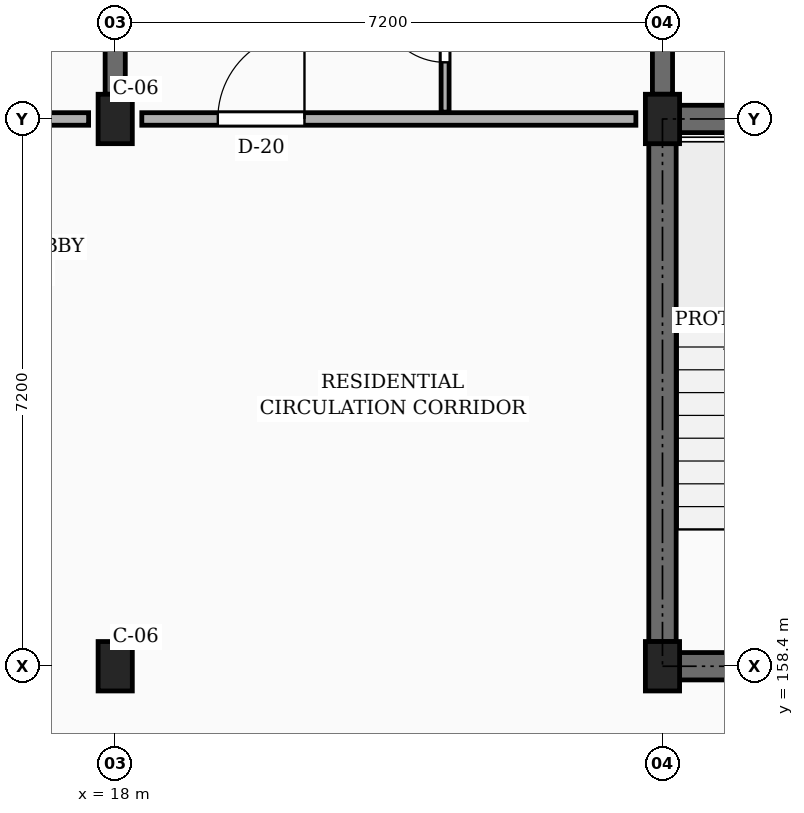
"""IFC4 building model, lengths in metres.
Left out: names, types, materials, properties, quantities, classifications, styles, units other than length and angle.
Written with IfcOpenShell. Run it as: python <this file> out.ifc"""

import sys

from ifc_helpers import new_model, si_unit, direction, frame, frame_2d, origin, origin_2d, place, context, subcontext, project, spatial, rectangle, extrude, element, fill, save


model = new_model("IFC4")
c1 = context("Model", 3, precision=1e-05, world=origin(), true_north=direction((0.0, 1.0)))
c2 = subcontext(c1, "Body", "Model", "MODEL_VIEW")
j1 = project(units=[si_unit("LENGTHUNIT", "METRE"), si_unit("PLANEANGLEUNIT", "RADIAN")], contexts=[c1])
p1 = place(None, origin())
s1 = spatial("IfcSite", under=j1, at=p1, CompositionType="ELEMENT")
p2 = place(p1, origin())
s2 = spatial("IfcBuilding", under=s1, at=p2, CompositionType="ELEMENT")
p3 = place(p2, frame((0.0, 0.0, 10.8)))
s3 = spatial("IfcBuildingStorey", under=s2, at=p3, CompositionType="ELEMENT", Elevation=10.8)
for number, where, z_axis, x_axis in (
    (1, (18.0, 158.4, 0.0), (0.0, 0.0, 1.0), (1.0, 0.0, 0.0)),
    (2, (18.0, 165.6, 0.0), (0.0, 0.0, 1.0), (1.0, 0.0, 0.0)),
    (3, (25.2, 158.4, 0.0), (0.0, 0.0, 1.0), (1.0, 0.0, 0.0)),
    (4, (25.2, 165.6, 0.0), (0.0, 0.0, 1.0), (1.0, 0.0, 0.0)),
):
    element("IfcColumn", number, at=place(p3, frame(where, z_axis=z_axis, x_axis=x_axis)), inside=s3, PredefinedType="COLUMN", context=c2, shape_type="SweptSolid", body=[
        extrude(rectangle(XDim=0.45, YDim=0.65, at=origin_2d()), origin(), (0.0, 0.0, 1.0), 3.15),
    ])
p4 = place(p3, frame((18.0, 165.925, 0.0), z_axis=(0.0, 0.0, 1.0), x_axis=(0.0, 1.0, 0.0)))
e5 = element("IfcWall", 5, at=p4, inside=s3, PredefinedType="SOLIDWALL", context=c2, shape_type="SweptSolid", body=[
    extrude(rectangle(XDim=6.6, YDim=0.265, at=frame_2d((3.3, 0.0))), origin(), (0.0, 0.0, 1.0), 2.185),
])
p5 = place(p3, frame((25.2, 165.925, 0.0), z_axis=(0.0, 0.0, 1.0), x_axis=(0.0, 1.0, 0.0)))
e6 = element("IfcWall", 6, at=p5, inside=s3, PredefinedType="SOLIDWALL", context=c2, shape_type="SweptSolid", body=[
    extrude(rectangle(XDim=6.6, YDim=0.265, at=frame_2d((3.3, 0.0))), origin(), (0.0, 0.0, 1.0), 2.185),
])
p6 = place(p5, frame((4.15, 0.0, 0.0)))
e7 = element("IfcOpeningElement", 7, at=p6, cuts=e6, PredefinedType="OPENING", context=c2, shape_type="SweptSolid", body=[
    extrude(rectangle(XDim=0.98, YDim=2.12, at=frame_2d((0.49, 1.06))), frame((0.0, 0.143, 0.0), z_axis=(0.0, -1.0, 0.0), x_axis=(1.0, 0.0, 0.0)), (0.0, 0.0, 1.0), 0.285),
])
p7 = place(p3, frame((25.2, 158.725, 0.0), z_axis=(0.0, 0.0, 1.0), x_axis=(0.0, 1.0, 0.0)))
e8 = element("IfcWall", 8, at=p7, inside=s3, PredefinedType="SHEAR", context=c2, shape_type="SweptSolid", body=[
    extrude(rectangle(XDim=6.55, YDim=0.36, at=frame_2d((3.275, 0.0))), origin(), (0.0, 0.0, 1.0), 2.885),
])
p8 = place(p3, frame((25.425, 165.6, 0.0), z_axis=(0.0, 0.0, 1.0), x_axis=(1.0, 0.0, 0.0)))
e9 = element("IfcWall", 9, at=p8, inside=s3, PredefinedType="SHEAR", context=c2, shape_type="SweptSolid", body=[
    extrude(rectangle(XDim=6.75, YDim=0.36, at=frame_2d((3.375, 0.0))), origin(), (0.0, 0.0, 1.0), 2.885),
])
p9 = place(p3, frame((25.425, 158.4, 0.0), z_axis=(0.0, 0.0, 1.0), x_axis=(1.0, 0.0, 0.0)))
e10 = element("IfcWall", 10, at=p9, inside=s3, PredefinedType="SHEAR", context=c2, shape_type="SweptSolid", body=[
    extrude(rectangle(XDim=6.75, YDim=0.36, at=frame_2d((3.375, 0.0))), origin(), (0.0, 0.0, 1.0), 2.885),
])
p10 = place(p9, frame((4.525, 0.0, 0.0)))
e11 = element("IfcOpeningElement", 11, at=p10, cuts=e10, PredefinedType="OPENING", context=c2, shape_type="SweptSolid", body=[
    extrude(rectangle(XDim=1.1, YDim=2.15, at=frame_2d((0.55, 1.075))), frame((0.0, 0.19, 0.0), z_axis=(0.0, -1.0, 0.0), x_axis=(1.0, 0.0, 0.0)), (0.0, 0.0, 1.0), 0.38),
])
p11 = place(p3, frame((11.15, 165.6, 0.0), z_axis=(0.0, 0.0, 1.0), x_axis=(1.0, 0.0, 0.0)))
e12 = element("IfcWall", 12, at=p11, inside=s3, PredefinedType="PARTITIONING", context=c2, shape_type="SweptSolid", body=[
    extrude(rectangle(XDim=6.5, YDim=0.165, at=frame_2d((3.25, 0.0))), origin(), (0.0, 0.0, 1.0), 2.235),
])
p12 = place(p11, frame((1.0, 0.0, 0.0)))
e13 = element("IfcOpeningElement", 13, at=p12, cuts=e12, PredefinedType="OPENING", context=c2, shape_type="SweptSolid", body=[
    extrude(rectangle(XDim=0.94, YDim=2.12, at=frame_2d((0.47, 1.06))), frame((0.0, 0.093, 0.0), z_axis=(0.0, -1.0, 0.0), x_axis=(1.0, 0.0, 0.0)), (0.0, 0.0, 1.0), 0.185),
])
p13 = place(p3, frame((18.35, 165.6, 0.0), z_axis=(0.0, 0.0, 1.0), x_axis=(1.0, 0.0, 0.0)))
e14 = element("IfcWall", 14, at=p13, inside=s3, PredefinedType="PARTITIONING", context=c2, shape_type="SweptSolid", body=[
    extrude(rectangle(XDim=6.5, YDim=0.165, at=frame_2d((3.25, 0.0))), origin(), (0.0, 0.0, 1.0), 2.235),
])
p14 = place(p13, frame((1.0, 0.0, 0.0)))
e15 = element("IfcOpeningElement", 15, at=p14, cuts=e14, PredefinedType="OPENING", context=c2, shape_type="SweptSolid", body=[
    extrude(rectangle(XDim=1.14, YDim=2.18, at=frame_2d((0.57, 1.09))), frame((0.0, 0.093, 0.0), z_axis=(0.0, -1.0, 0.0), x_axis=(1.0, 0.0, 0.0)), (0.0, 0.0, 1.0), 0.185),
])
p15 = place(p3, frame((22.34, 165.69, 0.0), z_axis=(0.0, 0.0, 1.0), x_axis=(0.0, 1.0, 0.0)))
e16 = element("IfcWall", 16, at=p15, inside=s3, PredefinedType="PARTITIONING", context=c2, shape_type="SweptSolid", body=[
    extrude(rectangle(XDim=2.18, YDim=0.105, at=frame_2d((1.09, 0.0))), origin(), (0.0, 0.0, 1.0), 2.32),
])
p16 = place(p15, frame((0.655, 0.0, 0.0)))
e17 = element("IfcOpeningElement", 17, at=p16, cuts=e16, PredefinedType="OPENING", context=c2, shape_type="SweptSolid", body=[
    extrude(rectangle(XDim=0.87, YDim=2.05, at=frame_2d((0.435, 1.025))), frame((0.0, 0.062, 0.0), z_axis=(0.0, -1.0, 0.0), x_axis=(1.0, 0.0, 0.0)), (0.0, 0.0, 1.0), 0.125),
])
p17 = place(p14, origin())
e18 = element("IfcDoor", 18, at=p17, inside=s3, OperationType="SINGLE_SWING_RIGHT", PredefinedType="DOOR", context=c2, shape_type="SweptSolid", body=[
    extrude(rectangle(XDim=1.14, YDim=2.18, at=frame_2d((0.57, 1.09))), frame((0.0, 0.025, 0.0), z_axis=(0.0, -1.0, 0.0), x_axis=(1.0, 0.0, 0.0)), (0.0, 0.0, 1.0), 0.05),
])
fill(e15, e18)
p18 = place(p16, origin())
e19 = element("IfcDoor", 19, at=p18, inside=s3, OperationType="SINGLE_SWING_RIGHT", PredefinedType="DOOR", context=c2, shape_type="SweptSolid", body=[
    extrude(rectangle(XDim=0.87, YDim=2.05, at=frame_2d((0.435, 1.025))), frame((0.0, 0.025, 0.0), z_axis=(0.0, -1.0, 0.0), x_axis=(1.0, 0.0, 0.0)), (0.0, 0.0, 1.0), 0.05),
])
fill(e17, e19)
save(model, sys.argv[1])
